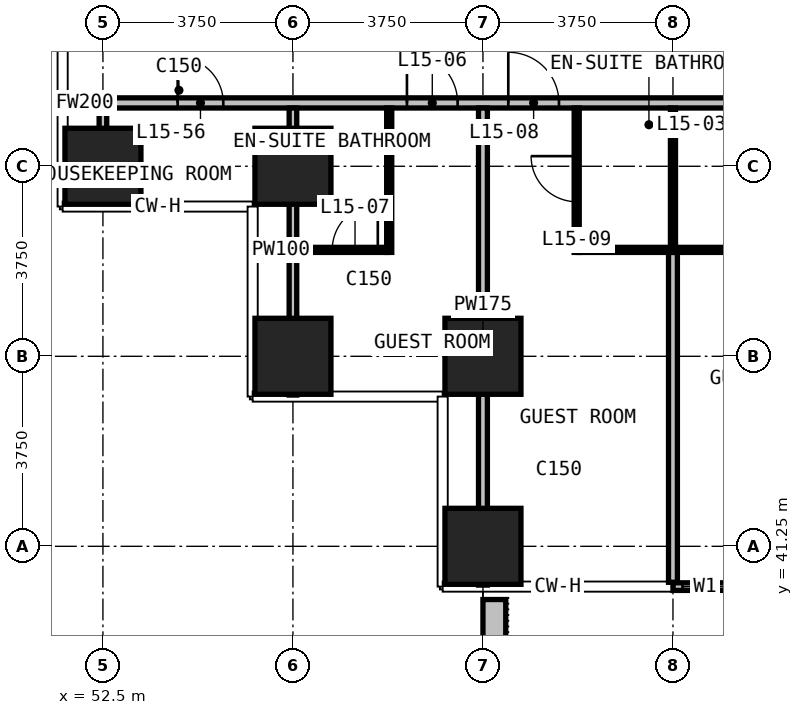
"""IFC4 building model, lengths in metres.
Left out: names, types, materials, properties, quantities, classifications, styles, units other than length and angle.
Written with IfcOpenShell. Run it as: python <this file> out.ifc"""

import sys

from ifc_helpers import new_model, si_unit, direction, frame, frame_2d, origin, origin_2d, place, context, subcontext, project, spatial, rectangle, extrude, element, fill, save


model = new_model("IFC4")
c1 = context("Model", 3, precision=1e-05, world=origin(), true_north=direction((0.0, 1.0)))
c2 = subcontext(c1, "Body", "Model", "MODEL_VIEW")
j1 = project(units=[si_unit("LENGTHUNIT", "METRE"), si_unit("PLANEANGLEUNIT", "RADIAN")], contexts=[c1])
p1 = place(None, origin())
s1 = spatial("IfcSite", under=j1, at=p1, CompositionType="ELEMENT")
p2 = place(p1, origin())
s2 = spatial("IfcBuilding", under=s1, at=p2, CompositionType="ELEMENT")
p3 = place(p2, frame((0.0, 0.0, 69.2)))
s3 = spatial("IfcBuildingStorey", under=s2, at=p3, CompositionType="ELEMENT", Elevation=69.2)
for number, where, z_axis, x_axis in (
    (1, (52.5, 48.75, 0.0), (0.0, 0.0, 1.0), (1.0, 0.0, 0.0)),
    (2, (56.25, 45.0, 0.0), (0.0, 0.0, 1.0), (1.0, 0.0, 0.0)),
    (3, (56.25, 48.75, 0.0), (0.0, 0.0, 1.0), (1.0, 0.0, 0.0)),
    (4, (60.0, 41.25, 0.0), (0.0, 0.0, 1.0), (1.0, 0.0, 0.0)),
    (5, (60.0, 45.0, 0.0), (0.0, 0.0, 1.0), (1.0, 0.0, 0.0)),
):
    element("IfcColumn", number, at=place(p3, frame(where, z_axis=z_axis, x_axis=x_axis)), inside=s3, PredefinedType="COLUMN", context=c2, shape_type="SweptSolid", body=[
        extrude(rectangle(XDim=1.5, YDim=1.5, at=origin_2d()), origin(), (0.0, 0.0, 1.0), 3.3),
    ])
p4 = place(p3, frame((63.75, 40.455, 0.0), z_axis=(0.0, 0.0, 1.0), x_axis=(1.0, 0.0, 0.0)))
e6 = element("IfcWall", 6, at=p4, inside=s3, PredefinedType="SOLIDWALL", context=c2, shape_type="SweptSolid", body=[
    extrude(rectangle(XDim=3.75, YDim=0.15, at=frame_2d((1.875, 0.0))), origin(), (0.0, 0.0, 1.0), 3.0),
])
p5 = place(p4, frame((0.188, 0.0, 0.1)))
e7 = element("IfcOpeningElement", 7, at=p5, cuts=e6, PredefinedType="OPENING", context=c2, shape_type="SweptSolid", body=[
    extrude(rectangle(XDim=0.9, YDim=2.4, at=frame_2d((0.45, 1.2))), frame((0.0, 0.085, 0.0), z_axis=(0.0, -1.0, 0.0), x_axis=(1.0, 0.0, 0.0)), (0.0, 0.0, 1.0), 0.17),
])
p6 = place(p4, frame((1.275, 0.0, 0.0)))
e8 = element("IfcOpeningElement", 8, at=p6, cuts=e6, PredefinedType="OPENING", context=c2, shape_type="SweptSolid", body=[
    extrude(rectangle(XDim=1.2, YDim=2.4, at=frame_2d((0.6, 1.2))), frame((0.0, 0.085, 0.0), z_axis=(0.0, -1.0, 0.0), x_axis=(1.0, 0.0, 0.0)), (0.0, 0.0, 1.0), 0.17),
])
p7 = place(p3, frame((60.225, 40.2, 0.0), z_axis=(0.0, 0.0, 1.0), x_axis=(0.0, -1.0, 0.0)))
e9 = element("IfcWall", 9, at=p7, inside=s3, PredefinedType="USERDEFINED", context=c2, shape_type="SweptSolid", body=[
    extrude(rectangle(XDim=2.35, YDim=0.45, at=frame_2d((1.175, 0.0))), origin(), (0.0, 0.0, 1.0), 1.1),
])
p8 = place(p3, frame((51.855, 50.0, 0.0), z_axis=(0.0, 0.0, 1.0), x_axis=(1.0, 0.0, 0.0)))
e10 = element("IfcWall", 10, at=p8, inside=s3, PredefinedType="PARTITIONING", context=c2, shape_type="SweptSolid", body=[
    extrude(rectangle(XDim=0.57, YDim=0.2, at=frame_2d((0.285, 0.0))), origin(), (0.0, 0.0, 1.0), 3.0),
])
p9 = place(p3, frame((52.575, 50.0, 0.0), z_axis=(0.0, 0.0, 1.0), x_axis=(1.0, 0.0, 0.0)))
e11 = element("IfcWall", 11, at=p9, inside=s3, PredefinedType="PARTITIONING", context=c2, shape_type="SweptSolid", body=[
    extrude(rectangle(XDim=44.85, YDim=0.2, at=frame_2d((22.425, 0.0))), origin(), (0.0, 0.0, 1.0), 3.0),
])
p10 = place(p9, frame((5.925, 0.0, 0.0)))
e12 = element("IfcOpeningElement", 12, at=p10, cuts=e11, PredefinedType="OPENING", context=c2, shape_type="SweptSolid", body=[
    extrude(rectangle(XDim=1.0, YDim=2.2, at=frame_2d((0.5, 1.1))), frame((0.0, 0.11, 0.0), z_axis=(0.0, -1.0, 0.0), x_axis=(1.0, 0.0, 0.0)), (0.0, 0.0, 1.0), 0.22),
])
p11 = place(p9, frame((7.925, 0.0, 0.0)))
e13 = element("IfcOpeningElement", 13, at=p11, cuts=e11, PredefinedType="OPENING", context=c2, shape_type="SweptSolid", body=[
    extrude(rectangle(XDim=1.0, YDim=2.2, at=frame_2d((0.5, 1.1))), frame((0.0, 0.11, 0.0), z_axis=(0.0, -1.0, 0.0), x_axis=(1.0, 0.0, 0.0)), (0.0, 0.0, 1.0), 0.22),
])
p12 = place(p9, frame((13.425, 0.0, 0.0)))
e14 = element("IfcOpeningElement", 14, at=p12, cuts=e11, PredefinedType="OPENING", context=c2, shape_type="SweptSolid", body=[
    extrude(rectangle(XDim=1.0, YDim=2.2, at=frame_2d((0.5, 1.1))), frame((0.0, 0.11, 0.0), z_axis=(0.0, -1.0, 0.0), x_axis=(1.0, 0.0, 0.0)), (0.0, 0.0, 1.0), 0.22),
])
p13 = place(p9, frame((15.425, 0.0, 0.0)))
e15 = element("IfcOpeningElement", 15, at=p13, cuts=e11, PredefinedType="OPENING", context=c2, shape_type="SweptSolid", body=[
    extrude(rectangle(XDim=1.0, YDim=2.2, at=frame_2d((0.5, 1.1))), frame((0.0, 0.11, 0.0), z_axis=(0.0, -1.0, 0.0), x_axis=(1.0, 0.0, 0.0)), (0.0, 0.0, 1.0), 0.22),
])
p14 = place(p9, frame((20.925, 0.0, 0.0)))
e16 = element("IfcOpeningElement", 16, at=p14, cuts=e11, PredefinedType="OPENING", context=c2, shape_type="SweptSolid", body=[
    extrude(rectangle(XDim=1.0, YDim=2.2, at=frame_2d((0.5, 1.1))), frame((0.0, 0.11, 0.0), z_axis=(0.0, -1.0, 0.0), x_axis=(1.0, 0.0, 0.0)), (0.0, 0.0, 1.0), 0.22),
])
p15 = place(p9, frame((22.925, 0.0, 0.0)))
e17 = element("IfcOpeningElement", 17, at=p15, cuts=e11, PredefinedType="OPENING", context=c2, shape_type="SweptSolid", body=[
    extrude(rectangle(XDim=1.0, YDim=2.2, at=frame_2d((0.5, 1.1))), frame((0.0, 0.11, 0.0), z_axis=(0.0, -1.0, 0.0), x_axis=(1.0, 0.0, 0.0)), (0.0, 0.0, 1.0), 0.22),
])
p16 = place(p9, frame((28.425, 0.0, 0.0)))
e18 = element("IfcOpeningElement", 18, at=p16, cuts=e11, PredefinedType="OPENING", context=c2, shape_type="SweptSolid", body=[
    extrude(rectangle(XDim=1.0, YDim=2.2, at=frame_2d((0.5, 1.1))), frame((0.0, 0.11, 0.0), z_axis=(0.0, -1.0, 0.0), x_axis=(1.0, 0.0, 0.0)), (0.0, 0.0, 1.0), 0.22),
])
p17 = place(p9, frame((30.425, 0.0, 0.0)))
e19 = element("IfcOpeningElement", 19, at=p17, cuts=e11, PredefinedType="OPENING", context=c2, shape_type="SweptSolid", body=[
    extrude(rectangle(XDim=1.0, YDim=2.2, at=frame_2d((0.5, 1.1))), frame((0.0, 0.11, 0.0), z_axis=(0.0, -1.0, 0.0), x_axis=(1.0, 0.0, 0.0)), (0.0, 0.0, 1.0), 0.22),
])
p18 = place(p9, frame((35.925, 0.0, 0.0)))
e20 = element("IfcOpeningElement", 20, at=p18, cuts=e11, PredefinedType="OPENING", context=c2, shape_type="SweptSolid", body=[
    extrude(rectangle(XDim=1.0, YDim=2.2, at=frame_2d((0.5, 1.1))), frame((0.0, 0.11, 0.0), z_axis=(0.0, -1.0, 0.0), x_axis=(1.0, 0.0, 0.0)), (0.0, 0.0, 1.0), 0.22),
])
p19 = place(p9, frame((37.925, 0.0, 0.0)))
e21 = element("IfcOpeningElement", 21, at=p19, cuts=e11, PredefinedType="OPENING", context=c2, shape_type="SweptSolid", body=[
    extrude(rectangle(XDim=1.0, YDim=2.2, at=frame_2d((0.5, 1.1))), frame((0.0, 0.11, 0.0), z_axis=(0.0, -1.0, 0.0), x_axis=(1.0, 0.0, 0.0)), (0.0, 0.0, 1.0), 0.22),
])
p20 = place(p9, frame((1.4, 0.0, 0.0)))
e22 = element("IfcOpeningElement", 22, at=p20, cuts=e11, PredefinedType="OPENING", context=c2, shape_type="SweptSolid", body=[
    extrude(rectangle(XDim=0.9, YDim=2.2, at=frame_2d((0.45, 1.1))), frame((0.0, 0.11, 0.0), z_axis=(0.0, -1.0, 0.0), x_axis=(1.0, 0.0, 0.0)), (0.0, 0.0, 1.0), 0.22),
])
p21 = place(p9, frame((42.575, 0.0, 0.0)))
e23 = element("IfcOpeningElement", 23, at=p21, cuts=e11, PredefinedType="OPENING", context=c2, shape_type="SweptSolid", body=[
    extrude(rectangle(XDim=0.9, YDim=2.2, at=frame_2d((0.45, 1.1))), frame((0.0, 0.11, 0.0), z_axis=(0.0, -1.0, 0.0), x_axis=(1.0, 0.0, 0.0)), (0.0, 0.0, 1.0), 0.22),
])
p22 = place(p3, frame((60.0, 40.485, 0.0), z_axis=(0.0, 0.0, 1.0), x_axis=(0.0, 1.0, 0.0)))
e24 = element("IfcWall", 24, at=p22, inside=s3, PredefinedType="PARTITIONING", context=c2, shape_type="SweptSolid", body=[
    extrude(rectangle(XDim=9.415, YDim=0.175, at=frame_2d((4.708, 0.0))), origin(), (0.0, 0.0, 1.0), 3.0),
])
p23 = place(p3, frame((63.75, 40.54, 0.0), z_axis=(0.0, 0.0, 1.0), x_axis=(0.0, 1.0, 0.0)))
e25 = element("IfcWall", 25, at=p23, inside=s3, PredefinedType="PARTITIONING", context=c2, shape_type="SweptSolid", body=[
    extrude(rectangle(XDim=6.51, YDim=0.175, at=frame_2d((3.255, 0.0))), origin(), (0.0, 0.0, 1.0), 3.0),
])
p24 = place(p3, frame((52.5, 48.105, 0.0), z_axis=(0.0, 0.0, 1.0), x_axis=(0.0, 1.0, 0.0)))
e26 = element("IfcWall", 26, at=p24, inside=s3, PredefinedType="PARTITIONING", context=c2, shape_type="SweptSolid", body=[
    extrude(rectangle(XDim=1.995, YDim=0.15, at=frame_2d((0.998, 0.0))), origin(), (0.0, 0.0, 1.0), 3.0),
])
p25 = place(p3, frame((56.25, 44.235, 0.0), z_axis=(0.0, 0.0, 1.0), x_axis=(0.0, 1.0, 0.0)))
e27 = element("IfcWall", 27, at=p25, inside=s3, PredefinedType="PARTITIONING", context=c2, shape_type="SweptSolid", body=[
    extrude(rectangle(XDim=5.665, YDim=0.15, at=frame_2d((2.833, 0.0))), origin(), (0.0, 0.0, 1.0), 3.0),
])
p26 = place(p3, frame((56.325, 47.1, 0.0), z_axis=(0.0, 0.0, 1.0), x_axis=(1.0, 0.0, 0.0)))
e28 = element("IfcWall", 28, at=p26, inside=s3, PredefinedType="PARTITIONING", context=c2, shape_type="SweptSolid", body=[
    extrude(rectangle(XDim=1.775, YDim=0.1, at=frame_2d((0.888, 0.0))), origin(), (0.0, 0.0, 1.0), 3.0),
])
p27 = place(p26, frame((0.7, 0.0, 0.0)))
e29 = element("IfcOpeningElement", 29, at=p27, cuts=e28, PredefinedType="OPENING", context=c2, shape_type="SweptSolid", body=[
    extrude(rectangle(XDim=0.9, YDim=2.2, at=frame_2d((0.45, 1.1))), frame((0.0, 0.06, 0.0), z_axis=(0.0, -1.0, 0.0), x_axis=(1.0, 0.0, 0.0)), (0.0, 0.0, 1.0), 0.12),
])
p28 = place(p3, frame((61.9, 47.1, 0.0), z_axis=(0.0, 0.0, 1.0), x_axis=(1.0, 0.0, 0.0)))
e30 = element("IfcWall", 30, at=p28, inside=s3, PredefinedType="PARTITIONING", context=c2, shape_type="SweptSolid", body=[
    extrude(rectangle(XDim=3.7, YDim=0.1, at=frame_2d((1.85, 0.0))), origin(), (0.0, 0.0, 1.0), 3.0),
])
p29 = place(p3, frame((58.15, 47.05, 0.0), z_axis=(0.0, 0.0, 1.0), x_axis=(0.0, 1.0, 0.0)))
e31 = element("IfcWall", 31, at=p29, inside=s3, PredefinedType="PARTITIONING", context=c2, shape_type="SweptSolid", body=[
    extrude(rectangle(XDim=2.85, YDim=0.1, at=frame_2d((1.425, 0.0))), origin(), (0.0, 0.0, 1.0), 3.0),
])
p30 = place(p3, frame((61.85, 47.05, 0.0), z_axis=(0.0, 0.0, 1.0), x_axis=(0.0, 1.0, 0.0)))
e32 = element("IfcWall", 32, at=p30, inside=s3, PredefinedType="PARTITIONING", context=c2, shape_type="SweptSolid", body=[
    extrude(rectangle(XDim=2.85, YDim=0.1, at=frame_2d((1.425, 0.0))), origin(), (0.0, 0.0, 1.0), 3.0),
])
p31 = place(p30, frame((1.0, 0.0, 0.0)))
e33 = element("IfcOpeningElement", 33, at=p31, cuts=e32, PredefinedType="OPENING", context=c2, shape_type="SweptSolid", body=[
    extrude(rectangle(XDim=0.9, YDim=2.2, at=frame_2d((0.45, 1.1))), frame((0.0, 0.06, 0.0), z_axis=(0.0, -1.0, 0.0), x_axis=(1.0, 0.0, 0.0)), (0.0, 0.0, 1.0), 0.12),
])
p32 = place(p3, frame((63.75, 47.15, 0.0), z_axis=(0.0, 0.0, 1.0), x_axis=(0.0, 1.0, 0.0)))
e34 = element("IfcWall", 34, at=p32, inside=s3, PredefinedType="PARTITIONING", context=c2, shape_type="SweptSolid", body=[
    extrude(rectangle(XDim=2.75, YDim=0.1, at=frame_2d((1.375, 0.0))), origin(), (0.0, 0.0, 1.0), 3.0),
])
p33 = place(p5, origin())
e35 = element("IfcWindow", 35, at=p33, inside=s3, PartitioningType="SINGLE_PANEL", PredefinedType="WINDOW", context=c2, shape_type="SweptSolid", body=[
    extrude(rectangle(XDim=0.9, YDim=2.4, at=frame_2d((0.45, 1.2))), frame((0.0, 0.03, 0.0), z_axis=(0.0, -1.0, 0.0), x_axis=(1.0, 0.0, 0.0)), (0.0, 0.0, 1.0), 0.06),
])
fill(e7, e35)
p34 = place(p10, origin())
e36 = element("IfcDoor", 36, at=p34, inside=s3, OperationType="SINGLE_SWING_LEFT", PredefinedType="DOOR", context=c2, shape_type="SweptSolid", body=[
    extrude(rectangle(XDim=1.0, YDim=2.2, at=frame_2d((0.5, 1.1))), frame((0.0, 0.025, 0.0), z_axis=(0.0, -1.0, 0.0), x_axis=(1.0, 0.0, 0.0)), (0.0, 0.0, 1.0), 0.05),
])
fill(e12, e36)
p35 = place(p27, origin())
e37 = element("IfcDoor", 37, at=p35, inside=s3, OperationType="SINGLE_SWING_RIGHT", PredefinedType="DOOR", context=c2, shape_type="SweptSolid", body=[
    extrude(rectangle(XDim=0.9, YDim=2.2, at=frame_2d((0.45, 1.1))), frame((0.0, 0.025, 0.0), z_axis=(0.0, -1.0, 0.0), x_axis=(1.0, 0.0, 0.0)), (0.0, 0.0, 1.0), 0.05),
])
fill(e29, e37)
p36 = place(p11, origin())
e38 = element("IfcDoor", 38, at=p36, inside=s3, OperationType="SINGLE_SWING_RIGHT", PredefinedType="DOOR", context=c2, shape_type="SweptSolid", body=[
    extrude(rectangle(XDim=1.0, YDim=2.2, at=frame_2d((0.5, 1.1))), frame((0.0, 0.025, 0.0), z_axis=(0.0, -1.0, 0.0), x_axis=(1.0, 0.0, 0.0)), (0.0, 0.0, 1.0), 0.05),
])
fill(e13, e38)
p37 = place(p31, origin())
e39 = element("IfcDoor", 39, at=p37, inside=s3, OperationType="SINGLE_SWING_RIGHT", PredefinedType="DOOR", context=c2, shape_type="SweptSolid", body=[
    extrude(rectangle(XDim=0.9, YDim=2.2, at=frame_2d((0.45, 1.1))), frame((0.0, 0.025, 0.0), z_axis=(0.0, -1.0, 0.0), x_axis=(1.0, 0.0, 0.0)), (0.0, 0.0, 1.0), 0.05),
])
fill(e33, e39)
p38 = place(p20, origin())
e40 = element("IfcDoor", 40, at=p38, inside=s3, OperationType="SINGLE_SWING_LEFT", PredefinedType="DOOR", context=c2, shape_type="SweptSolid", body=[
    extrude(rectangle(XDim=0.9, YDim=2.2, at=frame_2d((0.45, 1.1))), frame((0.0, 0.025, 0.0), z_axis=(0.0, -1.0, 0.0), x_axis=(1.0, 0.0, 0.0)), (0.0, 0.0, 1.0), 0.05),
])
fill(e22, e40)
save(model, sys.argv[1])
